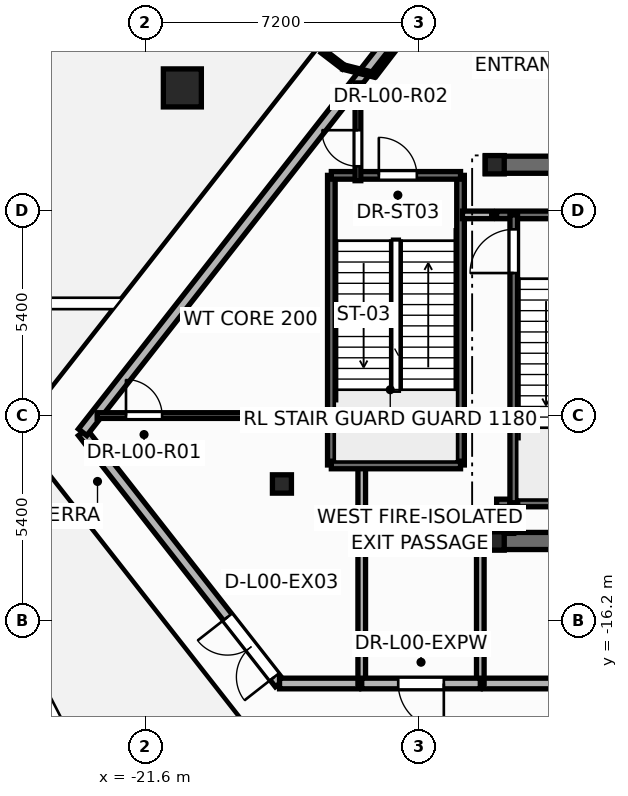
"""IFC4 building model, lengths in metres.
Left out: names, types, materials, properties, quantities, classifications, styles, units other than length and angle.
Written with IfcOpenShell. Run it as: python <this file> out.ifc"""

import sys

from ifc_helpers import new_model, si_unit, direction, frame, frame_2d, origin, origin_2d, place, context, subcontext, project, spatial, rectangle, hollow_circle, i_section, extrude, element, fill, save


model = new_model("IFC4")
c1 = context("Model", 3, precision=1e-05, world=origin(), true_north=direction((0.0, 1.0)))
c2 = subcontext(c1, "Body", "Model", "MODEL_VIEW")
j1 = project(units=[si_unit("LENGTHUNIT", "METRE"), si_unit("PLANEANGLEUNIT", "RADIAN")], contexts=[c1])
p1 = place(None, origin())
s1 = spatial("IfcSite", under=j1, at=p1, CompositionType="ELEMENT")
p2 = place(p1, origin())
s2 = spatial("IfcBuilding", under=s1, at=p2, CompositionType="ELEMENT")
p3 = place(p2, origin())
s3 = spatial("IfcBuildingStorey", under=s2, at=p3, CompositionType="ELEMENT", Elevation=0.0)
p4 = place(p3, frame((-20.62, -2.179, 0.0), z_axis=(0.0, 0.0, 1.0), x_axis=(1.0, 0.0, 0.0)))
e1 = element("IfcColumn", 1, at=p4, inside=s3, PredefinedType="COLUMN", context=c2, shape_type="SweptSolid", body=[
    extrude(hollow_circle(Radius=0.5, WallThickness=0.045, at=origin_2d()), origin(), (0.0, 0.0, 1.0), 5.4),
])
for number, where, z_axis, x_axis in (
    (2, (-12.4, -14.1, 0.0), (0.0, 0.0, 1.0), (1.0, 0.0, 0.0)),
    (3, (-12.4, -4.2, 0.0), (0.0, 0.0, 1.0), (1.0, 0.0, 0.0)),
    (4, (-18.0, -12.6, 0.0), (0.0, 0.0, 1.0), (1.0, 0.0, 0.0)),
):
    element("IfcColumn", number, at=place(p3, frame(where, z_axis=z_axis, x_axis=x_axis)), inside=s3, PredefinedType="COLUMN", context=c2, shape_type="SweptSolid", body=[
        extrude(i_section(OverallWidth=0.5, OverallDepth=0.482, WebThickness=0.04, FlangeThickness=0.045, at=origin_2d()), origin(), (0.0, 0.0, 1.0), 5.4),
    ])
p5 = place(p3, frame((-18.063, -17.85, -0.015), z_axis=(0.0, 0.0, 1.0), x_axis=(-0.616936653938, 0.787012811222, 0.0)))
e5 = element("IfcWall", 5, at=p5, inside=s3, PredefinedType="STANDARD", context=c2, shape_type="SweptSolid", body=[
    extrude(rectangle(XDim=8.399, YDim=0.28, at=frame_2d((4.199, 0.0))), origin(), (0.0, 0.0, 1.0), 5.135),
])
p6 = place(p5, frame((0.22, 0.0, 0.015)))
e6 = element("IfcOpeningElement", 6, at=p6, cuts=e5, PredefinedType="OPENING", context=c2, shape_type="SweptSolid", body=[
    extrude(rectangle(XDim=2.006, YDim=2.304, at=frame_2d((1.0, 1.152))), frame((0.0, 0.15, 0.0), z_axis=(0.0, -1.0, 0.0), x_axis=(1.0, 0.0, 0.0)), (0.0, 0.0, 1.0), 0.3),
])
p7 = place(p3, frame((-15.98, -17.85, -0.015), z_axis=(0.0, 0.0, 1.0), x_axis=(-1.0, 0.0, 0.0)))
e7 = element("IfcWall", 7, at=p7, inside=s3, PredefinedType="STANDARD", context=c2, shape_type="SweptSolid", body=[
    extrude(rectangle(XDim=2.083, YDim=0.28, at=frame_2d((1.042, 0.0))), origin(), (0.0, 0.0, 1.0), 5.135),
])
p8 = place(p3, frame((12.7, -17.85, -0.015), z_axis=(0.0, 0.0, 1.0), x_axis=(-1.0, 0.0, 0.0)))
e8 = element("IfcWall", 8, at=p8, inside=s3, PredefinedType="STANDARD", context=c2, shape_type="SweptSolid", body=[
    extrude(rectangle(XDim=25.4, YDim=0.28, at=frame_2d((12.7, 0.0))), origin(), (0.0, 0.0, 1.0), 4.498),
])
p9 = place(p8, frame((2.97, 0.0, 0.015)))
e9 = element("IfcOpeningElement", 9, at=p9, cuts=e8, PredefinedType="OPENING", context=c2, shape_type="SweptSolid", body=[
    extrude(rectangle(XDim=2.006, YDim=2.304, at=frame_2d((1.0, 1.152))), frame((0.0, 0.15, 0.0), z_axis=(0.0, -1.0, 0.0), x_axis=(1.0, 0.0, 0.0)), (0.0, 0.0, 1.0), 0.3),
])
p10 = place(p3, frame((-23.245, -11.24, -0.015), z_axis=(0.0, 0.0, 1.0), x_axis=(0.616945483616, 0.787005889588, 0.0)))
e10 = element("IfcWall", 10, at=p10, inside=s3, PredefinedType="STANDARD", context=c2, shape_type="SweptSolid", body=[
    extrude(rectangle(XDim=28.627, YDim=0.28, at=frame_2d((14.314, 0.0))), origin(), (0.0, 0.0, 1.0), 3.91),
])
p11 = place(p3, frame((-12.75, -14.1, 0.0), z_axis=(0.0, 0.0, 1.0), x_axis=(1.0, 0.0, 0.0)))
e11 = element("IfcWall", 11, at=p11, inside=s3, PredefinedType="SHEAR", context=c2, shape_type="SweptSolid", body=[
    extrude(rectangle(XDim=25.5, YDim=0.45, at=frame_2d((12.75, 0.0))), origin(), (0.0, 0.0, 1.0), 5.4),
])
p12 = place(p3, frame((-12.65, -4.2, 0.0), z_axis=(0.0, 0.0, 1.0), x_axis=(1.0, 0.0, 0.0)))
e12 = element("IfcWall", 12, at=p12, inside=s3, PredefinedType="SHEAR", context=c2, shape_type="SweptSolid", body=[
    extrude(rectangle(XDim=25.3, YDim=0.45, at=frame_2d((12.65, 0.0))), origin(), (0.0, 0.0, 1.0), 5.4),
])
p13 = place(p12, frame((1.85, 0.0, 0.0)))
e13 = element("IfcOpeningElement", 13, at=p13, cuts=e12, PredefinedType="OPENING", context=c2, shape_type="SweptSolid", body=[
    extrude(rectangle(XDim=0.756, YDim=2.054, at=frame_2d((0.375, 1.027))), frame((0.0, 0.235, 0.0), z_axis=(0.0, -1.0, 0.0), x_axis=(1.0, 0.0, 0.0)), (0.0, 0.0, 1.0), 0.47),
])
p14 = place(p12, frame((22.65, 0.0, 0.0)))
e14 = element("IfcOpeningElement", 14, at=p14, cuts=e12, PredefinedType="OPENING", context=c2, shape_type="SweptSolid", body=[
    extrude(rectangle(XDim=0.756, YDim=2.054, at=frame_2d((0.375, 1.027))), frame((0.0, 0.235, 0.0), z_axis=(0.0, -1.0, 0.0), x_axis=(1.0, 0.0, 0.0)), (0.0, 0.0, 1.0), 0.47),
])
p15 = place(p12, frame((5.85, 0.0, 0.0)))
e15 = element("IfcOpeningElement", 15, at=p15, cuts=e12, PredefinedType="OPENING", context=c2, shape_type="SweptSolid", body=[
    extrude(rectangle(XDim=1.006, YDim=2.104, at=frame_2d((0.5, 1.052))), frame((0.0, 0.235, 0.0), z_axis=(0.0, -1.0, 0.0), x_axis=(1.0, 0.0, 0.0)), (0.0, 0.0, 1.0), 0.47),
])
p16 = place(p12, frame((10.35, 0.0, 0.0)))
e16 = element("IfcOpeningElement", 16, at=p16, cuts=e12, PredefinedType="OPENING", context=c2, shape_type="SweptSolid", body=[
    extrude(rectangle(XDim=1.406, YDim=2.154, at=frame_2d((0.7, 1.077))), frame((0.0, 0.235, 0.0), z_axis=(0.0, -1.0, 0.0), x_axis=(1.0, 0.0, 0.0)), (0.0, 0.0, 1.0), 0.47),
])
p17 = place(p12, frame((18.45, 0.0, 0.0)))
e17 = element("IfcOpeningElement", 17, at=p17, cuts=e12, PredefinedType="OPENING", context=c2, shape_type="SweptSolid", body=[
    extrude(rectangle(XDim=1.006, YDim=2.104, at=frame_2d((0.5, 1.052))), frame((0.0, 0.235, 0.0), z_axis=(0.0, -1.0, 0.0), x_axis=(1.0, 0.0, 0.0)), (0.0, 0.0, 1.0), 0.47),
])
for number, where, z_axis, x_axis in (
    (18, (-12.35, -5.52, 0.0), (0.0, 0.0, 1.0), (1.0, 0.0, 0.0)),
    (19, (-12.35, -13.1, 0.0), (0.0, 0.0, 1.0), (1.0, 0.0, 0.0)),
):
    element("IfcWall", number, at=place(p3, frame(where, z_axis=z_axis, x_axis=x_axis)), inside=s3, PredefinedType="SOLIDWALL", context=c2, shape_type="SweptSolid", body=[
        extrude(rectangle(XDim=3.87, YDim=0.2, at=frame_2d((1.935, 0.0))), origin(), (0.0, 0.0, 1.0), 5.4),
    ])
p18 = place(p3, frame((-11.9, -13.1, 0.0), z_axis=(0.0, 0.0, 1.0), x_axis=(0.0, 1.0, 0.0)))
e20 = element("IfcWall", 20, at=p18, inside=s3, PredefinedType="SOLIDWALL", context=c2, shape_type="SweptSolid", body=[
    extrude(rectangle(XDim=7.58, YDim=0.2, at=frame_2d((3.79, 0.0))), origin(), (0.0, 0.0, 1.0), 5.4),
])
p19 = place(p18, frame((6.05, 0.0, 0.0)))
e21 = element("IfcOpeningElement", 21, at=p19, cuts=e20, PredefinedType="OPENING", context=c2, shape_type="SweptSolid", body=[
    extrude(rectangle(XDim=1.156, YDim=2.154, at=frame_2d((0.575, 1.077))), frame((0.0, 0.11, 0.0), z_axis=(0.0, -1.0, 0.0), x_axis=(1.0, 0.0, 0.0)), (0.0, 0.0, 1.0), 0.22),
])
for number, where, z_axis, x_axis in (
    (22, (-16.7, -12.1, 0.0), (0.0, 0.0, 1.0), (0.0, 1.0, 0.0)),
    (23, (-13.3, -12.1, 0.0), (0.0, 0.0, 1.0), (0.0, 1.0, 0.0)),
):
    element("IfcWall", number, at=place(p3, frame(where, z_axis=z_axis, x_axis=x_axis)), inside=s3, PredefinedType="SOLIDWALL", context=c2, shape_type="SweptSolid", body=[
        extrude(rectangle(XDim=7.62, YDim=0.2, at=frame_2d((3.81, 0.0))), origin(), (0.0, 0.0, 1.0), 5.4),
    ])
p20 = place(p3, frame((-22.862, -10.8, 0.0), z_axis=(0.0, 0.0, 1.0), x_axis=(1.0, 0.0, 0.0)))
e24 = element("IfcWall", 24, at=p20, inside=s3, PredefinedType="PARTITIONING", context=c2, shape_type="SweptSolid", body=[
    extrude(rectangle(XDim=6.222, YDim=0.15, at=frame_2d((3.111, 0.0))), origin(), (0.0, 0.0, 1.0), 5.12),
])
p21 = place(p20, frame((0.758, 0.0, 0.0)))
e25 = element("IfcOpeningElement", 25, at=p21, cuts=e24, PredefinedType="OPENING", context=c2, shape_type="SweptSolid", body=[
    extrude(rectangle(XDim=0.956, YDim=2.104, at=frame_2d((0.475, 1.052))), frame((0.0, 0.085, 0.0), z_axis=(0.0, -1.0, 0.0), x_axis=(1.0, 0.0, 0.0)), (0.0, 0.0, 1.0), 0.17),
])
p22 = place(p3, frame((-15.9, -17.85, 0.0), z_axis=(0.0, 0.0, 1.0), x_axis=(0.0, 1.0, 0.0)))
e26 = element("IfcWall", 26, at=p22, inside=s3, PredefinedType="SOLIDWALL", context=c2, shape_type="SweptSolid", body=[
    extrude(rectangle(XDim=5.73, YDim=0.2, at=frame_2d((2.865, 0.0))), origin(), (0.0, 0.0, 1.0), 5.12),
])
p23 = place(p3, frame((-12.78, -17.85, 0.0), z_axis=(0.0, 0.0, 1.0), x_axis=(0.0, 1.0, 0.0)))
e27 = element("IfcWall", 27, at=p23, inside=s3, PredefinedType="SOLIDWALL", context=c2, shape_type="SweptSolid", body=[
    extrude(rectangle(XDim=4.05, YDim=0.2, at=frame_2d((2.025, 0.0))), origin(), (0.0, 0.0, 1.0), 5.12),
])
p24 = place(p3, frame((-16.7, -12.1, 0.0), z_axis=(0.0, 0.0, 1.0), x_axis=(1.0, 0.0, 0.0)))
e28 = element("IfcWall", 28, at=p24, inside=s3, PredefinedType="SOLIDWALL", context=c2, shape_type="SweptSolid", body=[
    extrude(rectangle(XDim=3.4, YDim=0.2, at=frame_2d((1.7, 0.0))), origin(), (0.0, 0.0, 1.0), 5.4),
])
p25 = place(p3, frame((-16.7, -4.48, 0.0), z_axis=(0.0, 0.0, 1.0), x_axis=(1.0, 0.0, 0.0)))
e29 = element("IfcWall", 29, at=p25, inside=s3, PredefinedType="SOLIDWALL", context=c2, shape_type="SweptSolid", body=[
    extrude(rectangle(XDim=3.4, YDim=0.2, at=frame_2d((1.7, 0.0))), origin(), (0.0, 0.0, 1.0), 5.4),
])
p26 = place(p25, frame((1.25, 0.0, 0.0)))
e30 = element("IfcOpeningElement", 30, at=p26, cuts=e29, PredefinedType="OPENING", context=c2, shape_type="SweptSolid", body=[
    extrude(rectangle(XDim=1.006, YDim=2.104, at=frame_2d((0.5, 1.052))), frame((0.0, 0.11, 0.0), z_axis=(0.0, -1.0, 0.0), x_axis=(1.0, 0.0, 0.0)), (0.0, 0.0, 1.0), 0.22),
])
p27 = place(p3, frame((-12.78, -17.85, 0.0), z_axis=(0.0, 0.0, 1.0), x_axis=(-1.0, 0.0, 0.0)))
e31 = element("IfcWall", 31, at=p27, inside=s3, PredefinedType="STANDARD", context=c2, shape_type="SweptSolid", body=[
    extrude(rectangle(XDim=3.12, YDim=0.28, at=frame_2d((1.56, 0.0))), origin(), (0.0, 0.0, 1.0), 5.12),
])
p28 = place(p27, frame((0.96, 0.0, 0.0)))
e32 = element("IfcOpeningElement", 32, at=p28, cuts=e31, PredefinedType="OPENING", context=c2, shape_type="SweptSolid", body=[
    extrude(rectangle(XDim=1.206, YDim=2.154, at=frame_2d((0.6, 1.077))), frame((0.0, 0.15, 0.0), z_axis=(0.0, -1.0, 0.0), x_axis=(1.0, 0.0, 0.0)), (0.0, 0.0, 1.0), 0.3),
])
p29 = place(p3, frame((-16.0, -4.62, 0.0), z_axis=(0.0, 0.0, 1.0), x_axis=(0.0, 1.0, 0.0)))
e33 = element("IfcWall", 33, at=p29, inside=s3, PredefinedType="PARTITIONING", context=c2, shape_type="SweptSolid", body=[
    extrude(rectangle(XDim=2.573, YDim=0.15, at=frame_2d((1.287, 0.0))), origin(), (0.0, 0.0, 1.0), 5.12),
])
p30 = place(p29, frame((0.379, 0.0, 0.0)))
e34 = element("IfcOpeningElement", 34, at=p30, cuts=e33, PredefinedType="OPENING", context=c2, shape_type="SweptSolid", body=[
    extrude(rectangle(XDim=0.956, YDim=2.104, at=frame_2d((0.475, 1.052))), frame((0.0, 0.085, 0.0), z_axis=(0.0, -1.0, 0.0), x_axis=(1.0, 0.0, 0.0)), (0.0, 0.0, 1.0), 0.17),
])
p31 = place(p3, frame((-14.788, -0.82, 0.0), z_axis=(0.0, 0.0, 1.0), x_axis=(-0.608207299469, -0.793778231543, 0.0)))
e35 = element("IfcWall", 35, at=p31, inside=s3, PredefinedType="PARTITIONING", context=c2, shape_type="SweptSolid", body=[
    extrude(rectangle(XDim=1.28, YDim=0.12, at=frame_2d((0.64, 0.0))), origin(), (0.0, 0.0, 1.0), 5.12),
])
p32 = place(p3, frame((-12.78, -13.8, 0.0), z_axis=(0.0, 0.0, 1.0), x_axis=(1.0, 0.0, 0.0)))
e36 = element("IfcWall", 36, at=p32, inside=s3, PredefinedType="SOLIDWALL", context=c2, shape_type="SweptSolid", body=[
    extrude(rectangle(XDim=0.88, YDim=0.2, at=frame_2d((0.44, 0.0))), origin(), (0.0, 0.0, 1.0), 4.483),
])
p33 = place(p3, frame((-15.567, -1.836, 0.0), z_axis=(0.0, 0.0, 1.0), x_axis=(-0.969885196515, 0.243562529098, 0.0)))
e37 = element("IfcWall", 37, at=p33, inside=s3, PredefinedType="PARTITIONING", context=c2, shape_type="SweptSolid", body=[
    extrude(rectangle(XDim=0.839, YDim=0.12, at=frame_2d((0.419, 0.0))), origin(), (0.0, 0.0, 1.0), 5.12),
])
p34 = place(p3, frame((-13.25, -5.52, 0.0), z_axis=(0.0, 0.0, 1.0), x_axis=(1.0, 0.0, 0.0)))
e38 = element("IfcWall", 38, at=p34, inside=s3, PredefinedType="SOLIDWALL", context=c2, shape_type="SweptSolid", body=[
    extrude(rectangle(XDim=0.77, YDim=0.2, at=frame_2d((0.385, 0.0))), origin(), (0.0, 0.0, 1.0), 4.483),
])
p35 = place(p3, frame((-11.9, -13.8, 0.0), z_axis=(0.0, 0.0, 1.0), x_axis=(0.0, 1.0, 0.0)))
e39 = element("IfcWall", 39, at=p35, inside=s3, PredefinedType="SOLIDWALL", context=c2, shape_type="SweptSolid", body=[
    extrude(rectangle(XDim=0.7, YDim=0.2, at=frame_2d((0.35, 0.0))), origin(), (0.0, 0.0, 1.0), 5.12),
])
p36 = place(p3, frame((-16.381, -1.632, 0.0), z_axis=(0.0, 0.0, 1.0), x_axis=(-0.79396842603, 0.607958994068, 0.0)))
e40 = element("IfcWall", 40, at=p36, inside=s3, PredefinedType="PARTITIONING", context=c2, shape_type="SweptSolid", body=[
    extrude(rectangle(XDim=0.694, YDim=0.12, at=frame_2d((0.347, 0.0))), origin(), (0.0, 0.0, 1.0), 5.12),
])
p37 = place(p6, origin())
e41 = element("IfcDoor", 41, at=p37, inside=s3, OperationType="DOUBLE_DOOR_SINGLE_SWING", PredefinedType="DOOR", context=c2, shape_type="SweptSolid", body=[
    extrude(rectangle(XDim=2.0, YDim=2.3, at=frame_2d((1.0, 1.15))), frame((0.0, 0.025, 0.0), z_axis=(0.0, -1.0, 0.0), x_axis=(1.0, 0.0, 0.0)), (0.0, 0.0, 1.0), 0.05),
])
fill(e6, e41)
p38 = place(p19, origin())
e42 = element("IfcDoor", 42, at=p38, inside=s3, OperationType="SINGLE_SWING_LEFT", PredefinedType="DOOR", context=c2, shape_type="SweptSolid", body=[
    extrude(rectangle(XDim=1.15, YDim=2.15, at=frame_2d((0.575, 1.075))), frame((0.0, 0.025, 0.0), z_axis=(0.0, -1.0, 0.0), x_axis=(1.0, 0.0, 0.0)), (0.0, 0.0, 1.0), 0.05),
])
fill(e21, e42)
p39 = place(p26, origin())
e43 = element("IfcDoor", 43, at=p39, inside=s3, OperationType="SINGLE_SWING_LEFT", PredefinedType="DOOR", context=c2, shape_type="SweptSolid", body=[
    extrude(rectangle(XDim=1.0, YDim=2.1, at=frame_2d((0.5, 1.05))), frame((0.0, 0.025, 0.0), z_axis=(0.0, -1.0, 0.0), x_axis=(1.0, 0.0, 0.0)), (0.0, 0.0, 1.0), 0.05),
])
fill(e30, e43)
p40 = place(p28, origin())
e44 = element("IfcDoor", 44, at=p40, inside=s3, OperationType="SINGLE_SWING_LEFT", PredefinedType="DOOR", context=c2, shape_type="SweptSolid", body=[
    extrude(rectangle(XDim=1.2, YDim=2.15, at=frame_2d((0.6, 1.075))), frame((0.0, 0.025, 0.0), z_axis=(0.0, -1.0, 0.0), x_axis=(1.0, 0.0, 0.0)), (0.0, 0.0, 1.0), 0.05),
])
fill(e32, e44)
p41 = place(p21, origin())
e45 = element("IfcDoor", 45, at=p41, inside=s3, OperationType="SINGLE_SWING_LEFT", PredefinedType="DOOR", context=c2, shape_type="SweptSolid", body=[
    extrude(rectangle(XDim=0.95, YDim=2.1, at=frame_2d((0.475, 1.05))), frame((0.0, 0.025, 0.0), z_axis=(0.0, -1.0, 0.0), x_axis=(1.0, 0.0, 0.0)), (0.0, 0.0, 1.0), 0.05),
])
fill(e25, e45)
p42 = place(p30, origin())
e46 = element("IfcDoor", 46, at=p42, inside=s3, OperationType="SINGLE_SWING_RIGHT", PredefinedType="DOOR", context=c2, shape_type="SweptSolid", body=[
    extrude(rectangle(XDim=0.95, YDim=2.1, at=frame_2d((0.475, 1.05))), frame((0.0, 0.025, 0.0), z_axis=(0.0, -1.0, 0.0), x_axis=(1.0, 0.0, 0.0)), (0.0, 0.0, 1.0), 0.05),
])
fill(e34, e46)
save(model, sys.argv[1])
